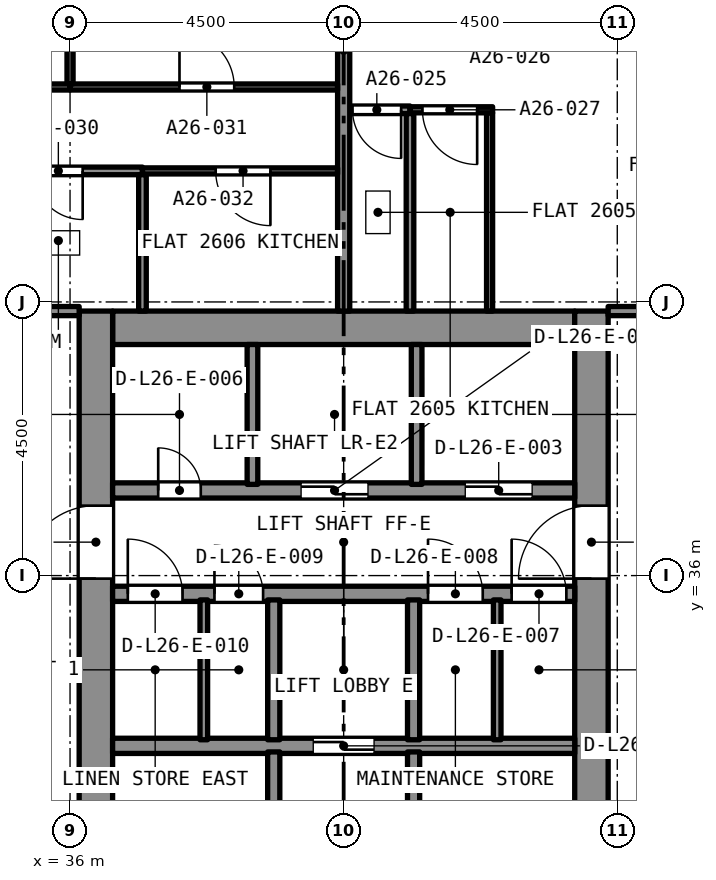
"""IFC4 building model, lengths in metres.
Left out: names, types, materials, properties, quantities, classifications, styles, units other than length and angle.
Written with IfcOpenShell. Run it as: python <this file> out.ifc"""

import sys

from ifc_helpers import new_model, si_unit, direction, frame, frame_2d, origin, place, context, subcontext, project, spatial, rectangle, extrude, element, fill, save


model = new_model("IFC4")
c1 = context("Model", 3, precision=1e-05, world=origin(), true_north=direction((0.0, 1.0)))
c2 = subcontext(c1, "Body", "Model", "MODEL_VIEW")
j1 = project(units=[si_unit("LENGTHUNIT", "METRE"), si_unit("PLANEANGLEUNIT", "RADIAN")], contexts=[c1])
p1 = place(None, origin())
s1 = spatial("IfcSite", under=j1, at=p1, CompositionType="ELEMENT")
p2 = place(p1, origin())
s2 = spatial("IfcBuilding", under=s1, at=p2, CompositionType="ELEMENT")
p3 = place(p2, frame((0.0, 0.0, 96.0)))
s3 = spatial("IfcBuildingStorey", under=s2, at=p3, CompositionType="ELEMENT", Elevation=96.0)
p4 = place(p3, frame((36.7, 40.075, 0.0), z_axis=(0.0, 0.0, 1.0), x_axis=(1.0, 0.0, 0.0)))
e1 = element("IfcWall", 1, at=p4, inside=s3, PredefinedType="SOLIDWALL", context=c2, shape_type="SweptSolid", body=[
    extrude(rectangle(XDim=7.6, YDim=0.55, at=frame_2d((3.8, 0.0))), origin(), (0.0, 0.0, 1.0), 3.2),
])
p5 = place(p3, frame((36.425, 27.15, 0.0), z_axis=(0.0, 0.0, 1.0), x_axis=(0.0, 1.0, 0.0)))
e2 = element("IfcWall", 2, at=p5, inside=s3, PredefinedType="SOLIDWALL", context=c2, shape_type="SweptSolid", body=[
    extrude(rectangle(XDim=13.2, YDim=0.55, at=frame_2d((6.6, 0.0))), origin(), (0.0, 0.0, 1.0), 3.2),
])
p6 = place(p5, frame((8.8, 0.0, 0.0)))
e3 = element("IfcOpeningElement", 3, at=p6, cuts=e2, PredefinedType="OPENING", context=c2, shape_type="SweptSolid", body=[
    extrude(rectangle(XDim=1.2, YDim=2.1, at=frame_2d((0.6, 1.05))), frame((0.0, 0.285, 0.0), z_axis=(0.0, -1.0, 0.0), x_axis=(1.0, 0.0, 0.0)), (0.0, 0.0, 1.0), 0.57),
])
p7 = place(p3, frame((44.575, 27.15, 0.0), z_axis=(0.0, 0.0, 1.0), x_axis=(0.0, 1.0, 0.0)))
e4 = element("IfcWall", 4, at=p7, inside=s3, PredefinedType="SOLIDWALL", context=c2, shape_type="SweptSolid", body=[
    extrude(rectangle(XDim=13.2, YDim=0.55, at=frame_2d((6.6, 0.0))), origin(), (0.0, 0.0, 1.0), 3.2),
])
p8 = place(p7, frame((8.8, 0.0, 0.0)))
e5 = element("IfcOpeningElement", 5, at=p8, cuts=e4, PredefinedType="OPENING", context=c2, shape_type="SweptSolid", body=[
    extrude(rectangle(XDim=1.2, YDim=2.1, at=frame_2d((0.6, 1.05))), frame((0.0, 0.285, 0.0), z_axis=(0.0, -1.0, 0.0), x_axis=(1.0, 0.0, 0.0)), (0.0, 0.0, 1.0), 0.57),
])
p9 = place(p3, frame((41.591, 43.66, 0.0), z_axis=(0.0, 0.0, 1.0), x_axis=(-1.0, 0.0, 0.0)))
e6 = element("IfcWall", 6, at=p9, inside=s3, PredefinedType="PARTITIONING", context=c2, shape_type="SweptSolid", body=[
    extrude(rectangle(XDim=0.991, YDim=0.125, at=frame_2d((0.495, 0.0))), origin(), (0.0, 0.0, 1.0), 2.9),
])
p10 = place(p9, frame((0.146, 0.0, 0.0)))
e7 = element("IfcOpeningElement", 7, at=p10, cuts=e6, PredefinedType="OPENING", context=c2, shape_type="SweptSolid", body=[
    extrude(rectangle(XDim=0.8, YDim=2.1, at=frame_2d((0.4, 1.05))), frame((0.0, 0.073, 0.0), z_axis=(0.0, -1.0, 0.0), x_axis=(1.0, 0.0, 0.0)), (0.0, 0.0, 1.0), 0.145),
])
p11 = place(p3, frame((41.591, 40.35, 0.0), z_axis=(0.0, 0.0, 1.0), x_axis=(0.0, 1.0, 0.0)))
e8 = element("IfcWall", 8, at=p11, inside=s3, PredefinedType="PARTITIONING", context=c2, shape_type="SweptSolid", body=[
    extrude(rectangle(XDim=3.247, YDim=0.125, at=frame_2d((1.624, 0.0))), origin(), (0.0, 0.0, 1.0), 2.9),
])
p12 = place(p3, frame((40.5, 40.35, 0.0), z_axis=(0.0, 0.0, 1.0), x_axis=(0.0, 1.0, 0.0)))
e9 = element("IfcWall", 9, at=p12, inside=s3, PredefinedType="PARTITIONING", context=c2, shape_type="SweptSolid", body=[
    extrude(rectangle(XDim=8.575, YDim=0.2, at=frame_2d((4.288, 0.0))), origin(), (0.0, 0.0, 1.0), 2.9),
])
p13 = place(p3, frame((42.9, 40.35, 0.0), z_axis=(0.0, 0.0, 1.0), x_axis=(0.0, 1.0, 0.0)))
e10 = element("IfcWall", 10, at=p13, inside=s3, PredefinedType="PARTITIONING", context=c2, shape_type="SweptSolid", body=[
    extrude(rectangle(XDim=3.26, YDim=0.1, at=frame_2d((1.63, 0.0))), origin(), (0.0, 0.0, 1.0), 2.9),
])
p14 = place(p3, frame((42.95, 43.66, 0.0), z_axis=(0.0, 0.0, 1.0), x_axis=(-1.0, 0.0, 0.0)))
e11 = element("IfcWall", 11, at=p14, inside=s3, PredefinedType="PARTITIONING", context=c2, shape_type="SweptSolid", body=[
    extrude(rectangle(XDim=1.359, YDim=0.1, at=frame_2d((0.68, 0.0))), origin(), (0.0, 0.0, 1.0), 2.9),
])
p15 = place(p14, frame((0.254, 0.0, 0.0)))
e12 = element("IfcOpeningElement", 12, at=p15, cuts=e11, PredefinedType="OPENING", context=c2, shape_type="SweptSolid", body=[
    extrude(rectangle(XDim=0.9, YDim=2.1, at=frame_2d((0.45, 1.05))), frame((0.0, 0.06, 0.0), z_axis=(0.0, -1.0, 0.0), x_axis=(1.0, 0.0, 0.0)), (0.0, 0.0, 1.0), 0.12),
])
p16 = place(p3, frame((44.85, 40.35, 0.0), z_axis=(0.0, 0.0, 1.0), x_axis=(1.0, 0.0, 0.0)))
e13 = element("IfcWall", 13, at=p16, inside=s3, PredefinedType="PARTITIONING", context=c2, shape_type="SweptSolid", body=[
    extrude(rectangle(XDim=4.075, YDim=0.15, at=frame_2d((2.038, 0.0))), origin(), (0.0, 0.0, 1.0), 2.9),
])
p17 = place(p16, frame((1.9, 0.0, 0.0)))
e14 = element("IfcOpeningElement", 14, at=p17, cuts=e13, PredefinedType="OPENING", context=c2, shape_type="SweptSolid", body=[
    extrude(rectangle(XDim=1.0, YDim=2.1, at=frame_2d((0.5, 1.05))), frame((0.0, 0.085, 0.0), z_axis=(0.0, -1.0, 0.0), x_axis=(1.0, 0.0, 0.0)), (0.0, 0.0, 1.0), 0.17),
])
p18 = place(p3, frame((37.19, 42.655, 0.0), z_axis=(0.0, 0.0, 1.0), x_axis=(-1.0, 0.0, 0.0)))
e15 = element("IfcWall", 15, at=p18, inside=s3, PredefinedType="PARTITIONING", context=c2, shape_type="SweptSolid", body=[
    extrude(rectangle(XDim=2.828, YDim=0.125, at=frame_2d((1.414, 0.0))), origin(), (0.0, 0.0, 1.0), 2.9),
])
p19 = place(p18, frame((0.983, 0.0, 0.0)))
e16 = element("IfcOpeningElement", 16, at=p19, cuts=e15, PredefinedType="OPENING", context=c2, shape_type="SweptSolid", body=[
    extrude(rectangle(XDim=0.8, YDim=2.1, at=frame_2d((0.4, 1.05))), frame((0.0, 0.073, 0.0), z_axis=(0.0, -1.0, 0.0), x_axis=(1.0, 0.0, 0.0)), (0.0, 0.0, 1.0), 0.145),
])
p20 = place(p3, frame((37.191, 40.35, 0.0), z_axis=(0.0, 0.0, 1.0), x_axis=(0.0, 1.0, 0.0)))
e17 = element("IfcWall", 17, at=p20, inside=s3, PredefinedType="PARTITIONING", context=c2, shape_type="SweptSolid", body=[
    extrude(rectangle(XDim=2.242, YDim=0.125, at=frame_2d((1.121, 0.0))), origin(), (0.0, 0.0, 1.0), 2.9),
])
p21 = place(p3, frame((34.425, 40.35, 0.0), z_axis=(0.0, 0.0, 1.0), x_axis=(1.0, 0.0, 0.0)))
e18 = element("IfcWall", 18, at=p21, inside=s3, PredefinedType="PARTITIONING", context=c2, shape_type="SweptSolid", body=[
    extrude(rectangle(XDim=1.725, YDim=0.15, at=frame_2d((0.862, 0.0))), origin(), (0.0, 0.0, 1.0), 2.9),
])
p22 = place(p3, frame((36.0, 44.035, 0.0), z_axis=(0.0, 0.0, 1.0), x_axis=(1.0, 0.0, 0.0)))
e19 = element("IfcWall", 19, at=p22, inside=s3, PredefinedType="PARTITIONING", context=c2, shape_type="SweptSolid", body=[
    extrude(rectangle(XDim=4.4, YDim=0.1, at=frame_2d((2.2, 0.0))), origin(), (0.0, 0.0, 1.0), 2.9),
])
p23 = place(p22, frame((1.8, 0.0, 0.0)))
e20 = element("IfcOpeningElement", 20, at=p23, cuts=e19, PredefinedType="OPENING", context=c2, shape_type="SweptSolid", body=[
    extrude(rectangle(XDim=0.9, YDim=2.1, at=frame_2d((0.45, 1.05))), frame((0.0, 0.06, 0.0), z_axis=(0.0, -1.0, 0.0), x_axis=(1.0, 0.0, 0.0)), (0.0, 0.0, 1.0), 0.12),
])
p24 = place(p3, frame((36.0, 44.085, 0.0), z_axis=(0.0, 0.0, 1.0), x_axis=(0.0, 1.0, 0.0)))
e21 = element("IfcWall", 21, at=p24, inside=s3, PredefinedType="PARTITIONING", context=c2, shape_type="SweptSolid", body=[
    extrude(rectangle(XDim=4.84, YDim=0.1, at=frame_2d((2.42, 0.0))), origin(), (0.0, 0.0, 1.0), 2.9),
])
p25 = place(p3, frame((40.4, 42.655, 0.0), z_axis=(0.0, 0.0, 1.0), x_axis=(-1.0, 0.0, 0.0)))
e22 = element("IfcWall", 22, at=p25, inside=s3, PredefinedType="PARTITIONING", context=c2, shape_type="SweptSolid", body=[
    extrude(rectangle(XDim=3.209, YDim=0.1, at=frame_2d((1.605, 0.0))), origin(), (0.0, 0.0, 1.0), 2.9),
])
p26 = place(p25, frame((1.105, 0.0, 0.0)))
e23 = element("IfcOpeningElement", 23, at=p26, cuts=e22, PredefinedType="OPENING", context=c2, shape_type="SweptSolid", body=[
    extrude(rectangle(XDim=0.9, YDim=2.1, at=frame_2d((0.45, 1.05))), frame((0.0, 0.06, 0.0), z_axis=(0.0, -1.0, 0.0), x_axis=(1.0, 0.0, 0.0)), (0.0, 0.0, 1.0), 0.12),
])
p27 = place(p3, frame((31.6, 44.035, 0.0), z_axis=(0.0, 0.0, 1.0), x_axis=(1.0, 0.0, 0.0)))
e24 = element("IfcWall", 24, at=p27, inside=s3, PredefinedType="PARTITIONING", context=c2, shape_type="SweptSolid", body=[
    extrude(rectangle(XDim=4.4, YDim=0.1, at=frame_2d((2.2, 0.0))), origin(), (0.0, 0.0, 1.0), 2.9),
])
p28 = place(p27, frame((1.65, 0.0, 0.0)))
e25 = element("IfcOpeningElement", 25, at=p28, cuts=e24, PredefinedType="OPENING", context=c2, shape_type="SweptSolid", body=[
    extrude(rectangle(XDim=1.0, YDim=2.1, at=frame_2d((0.5, 1.05))), frame((0.0, 0.06, 0.0), z_axis=(0.0, -1.0, 0.0), x_axis=(1.0, 0.0, 0.0)), (0.0, 0.0, 1.0), 0.12),
])
p29 = place(p3, frame((36.7, 33.2, 0.0), z_axis=(0.0, 0.0, 1.0), x_axis=(1.0, 0.0, 0.0)))
e26 = element("IfcWall", 26, at=p29, inside=s3, PredefinedType="SOLIDWALL", context=c2, shape_type="SweptSolid", body=[
    extrude(rectangle(XDim=7.6, YDim=0.25, at=frame_2d((3.8, 0.0))), origin(), (0.0, 0.0, 1.0), 2.9),
])
p30 = place(p29, frame((3.3, 0.0, 0.0)))
e27 = element("IfcOpeningElement", 27, at=p30, cuts=e26, PredefinedType="OPENING", context=c2, shape_type="SweptSolid", body=[
    extrude(rectangle(XDim=1.0, YDim=2.1, at=frame_2d((0.5, 1.05))), frame((0.0, 0.135, 0.0), z_axis=(0.0, -1.0, 0.0), x_axis=(1.0, 0.0, 0.0)), (0.0, 0.0, 1.0), 0.27),
])
p31 = place(p3, frame((36.7, 35.7, 0.0), z_axis=(0.0, 0.0, 1.0), x_axis=(1.0, 0.0, 0.0)))
e28 = element("IfcWall", 28, at=p31, inside=s3, PredefinedType="SOLIDWALL", context=c2, shape_type="SweptSolid", body=[
    extrude(rectangle(XDim=7.6, YDim=0.25, at=frame_2d((3.8, 0.0))), origin(), (0.0, 0.0, 1.0), 2.9),
])
p32 = place(p31, frame((6.562, 0.0, 0.0)))
e29 = element("IfcOpeningElement", 29, at=p32, cuts=e28, PredefinedType="OPENING", context=c2, shape_type="SweptSolid", body=[
    extrude(rectangle(XDim=0.9, YDim=2.1, at=frame_2d((0.45, 1.05))), frame((0.0, 0.135, 0.0), z_axis=(0.0, -1.0, 0.0), x_axis=(1.0, 0.0, 0.0)), (0.0, 0.0, 1.0), 0.27),
])
p33 = place(p31, frame((5.188, 0.0, 0.0)))
e30 = element("IfcOpeningElement", 30, at=p33, cuts=e28, PredefinedType="OPENING", context=c2, shape_type="SweptSolid", body=[
    extrude(rectangle(XDim=0.9, YDim=2.1, at=frame_2d((0.45, 1.05))), frame((0.0, 0.135, 0.0), z_axis=(0.0, -1.0, 0.0), x_axis=(1.0, 0.0, 0.0)), (0.0, 0.0, 1.0), 0.27),
])
p34 = place(p31, frame((1.675, 0.0, 0.0)))
e31 = element("IfcOpeningElement", 31, at=p34, cuts=e28, PredefinedType="OPENING", context=c2, shape_type="SweptSolid", body=[
    extrude(rectangle(XDim=0.8, YDim=2.1, at=frame_2d((0.4, 1.05))), frame((0.0, 0.135, 0.0), z_axis=(0.0, -1.0, 0.0), x_axis=(1.0, 0.0, 0.0)), (0.0, 0.0, 1.0), 0.27),
])
p35 = place(p31, frame((0.25, 0.0, 0.0)))
e32 = element("IfcOpeningElement", 32, at=p35, cuts=e28, PredefinedType="OPENING", context=c2, shape_type="SweptSolid", body=[
    extrude(rectangle(XDim=0.9, YDim=2.1, at=frame_2d((0.45, 1.05))), frame((0.0, 0.135, 0.0), z_axis=(0.0, -1.0, 0.0), x_axis=(1.0, 0.0, 0.0)), (0.0, 0.0, 1.0), 0.27),
])
p36 = place(p3, frame((36.7, 37.4, 0.0), z_axis=(0.0, 0.0, 1.0), x_axis=(1.0, 0.0, 0.0)))
e33 = element("IfcWall", 33, at=p36, inside=s3, PredefinedType="SOLIDWALL", context=c2, shape_type="SweptSolid", body=[
    extrude(rectangle(XDim=7.6, YDim=0.25, at=frame_2d((3.8, 0.0))), origin(), (0.0, 0.0, 1.0), 2.9),
])
p37 = place(p36, frame((5.8, 0.0, 0.0)))
e34 = element("IfcOpeningElement", 34, at=p37, cuts=e33, PredefinedType="OPENING", context=c2, shape_type="SweptSolid", body=[
    extrude(rectangle(XDim=1.1, YDim=2.4, at=frame_2d((0.55, 1.2))), frame((0.0, 0.135, 0.0), z_axis=(0.0, -1.0, 0.0), x_axis=(1.0, 0.0, 0.0)), (0.0, 0.0, 1.0), 0.27),
])
p38 = place(p36, frame((3.1, 0.0, 0.0)))
e35 = element("IfcOpeningElement", 35, at=p38, cuts=e33, PredefinedType="OPENING", context=c2, shape_type="SweptSolid", body=[
    extrude(rectangle(XDim=1.1, YDim=2.4, at=frame_2d((0.55, 1.2))), frame((0.0, 0.135, 0.0), z_axis=(0.0, -1.0, 0.0), x_axis=(1.0, 0.0, 0.0)), (0.0, 0.0, 1.0), 0.27),
])
p39 = place(p36, frame((0.75, 0.0, 0.0)))
e36 = element("IfcOpeningElement", 36, at=p39, cuts=e33, PredefinedType="OPENING", context=c2, shape_type="SweptSolid", body=[
    extrude(rectangle(XDim=0.7, YDim=2.1, at=frame_2d((0.35, 1.05))), frame((0.0, 0.135, 0.0), z_axis=(0.0, -1.0, 0.0), x_axis=(1.0, 0.0, 0.0)), (0.0, 0.0, 1.0), 0.27),
])
p40 = place(p3, frame((41.65, 27.7, 0.0), z_axis=(0.0, 0.0, 1.0), x_axis=(0.0, 1.0, 0.0)))
e37 = element("IfcWall", 37, at=p40, inside=s3, PredefinedType="SOLIDWALL", context=c2, shape_type="SweptSolid", body=[
    extrude(rectangle(XDim=5.4, YDim=0.2, at=frame_2d((2.7, 0.0))), origin(), (0.0, 0.0, 1.0), 2.9),
])
p41 = place(p40, frame((0.2, 0.0, 0.0)))
e38 = element("IfcOpeningElement", 38, at=p41, cuts=e37, PredefinedType="OPENING", context=c2, shape_type="SweptSolid", body=[
    extrude(rectangle(XDim=0.9, YDim=2.1, at=frame_2d((0.45, 1.05))), frame((0.0, 0.11, 0.0), z_axis=(0.0, -1.0, 0.0), x_axis=(1.0, 0.0, 0.0)), (0.0, 0.0, 1.0), 0.22),
])
p42 = place(p3, frame((39.35, 27.7, 0.0), z_axis=(0.0, 0.0, 1.0), x_axis=(0.0, 1.0, 0.0)))
e39 = element("IfcWall", 39, at=p42, inside=s3, PredefinedType="SOLIDWALL", context=c2, shape_type="SweptSolid", body=[
    extrude(rectangle(XDim=5.4, YDim=0.2, at=frame_2d((2.7, 0.0))), origin(), (0.0, 0.0, 1.0), 2.9),
])
p43 = place(p42, frame((0.2, 0.0, 0.0)))
e40 = element("IfcOpeningElement", 40, at=p43, cuts=e39, PredefinedType="OPENING", context=c2, shape_type="SweptSolid", body=[
    extrude(rectangle(XDim=0.9, YDim=2.1, at=frame_2d((0.45, 1.05))), frame((0.0, 0.11, 0.0), z_axis=(0.0, -1.0, 0.0), x_axis=(1.0, 0.0, 0.0)), (0.0, 0.0, 1.0), 0.22),
])
for number, where, z_axis, x_axis in (
    (41, (41.65, 33.3, 0.0), (0.0, 0.0, 1.0), (0.0, 1.0, 0.0)),
    (42, (39.35, 33.3, 0.0), (0.0, 0.0, 1.0), (0.0, 1.0, 0.0)),
):
    element("IfcWall", number, at=place(p3, frame(where, z_axis=z_axis, x_axis=x_axis)), inside=s3, PredefinedType="SOLIDWALL", context=c2, shape_type="SweptSolid", body=[
        extrude(rectangle(XDim=2.3, YDim=0.2, at=frame_2d((1.15, 0.0))), origin(), (0.0, 0.0, 1.0), 2.9),
    ])
for number, where, z_axis, x_axis in (
    (43, (41.7, 37.5, 0.0), (0.0, 0.0, 1.0), (0.0, 1.0, 0.0)),
    (44, (39.0, 37.5, 0.0), (0.0, 0.0, 1.0), (0.0, 1.0, 0.0)),
):
    element("IfcWall", number, at=place(p3, frame(where, z_axis=z_axis, x_axis=x_axis)), inside=s3, PredefinedType="SOLIDWALL", context=c2, shape_type="SweptSolid", body=[
        extrude(rectangle(XDim=2.3, YDim=0.175, at=frame_2d((1.15, 0.0))), origin(), (0.0, 0.0, 1.0), 2.9),
    ])
for number, where, z_axis, x_axis in (
    (45, (43.025, 33.3, 0.0), (0.0, 0.0, 1.0), (0.0, 1.0, 0.0)),
    (46, (38.2, 33.3, 0.0), (0.0, 0.0, 1.0), (0.0, 1.0, 0.0)),
):
    element("IfcWall", number, at=place(p3, frame(where, z_axis=z_axis, x_axis=x_axis)), inside=s3, PredefinedType="PARTITIONING", context=c2, shape_type="SweptSolid", body=[
        extrude(rectangle(XDim=2.3, YDim=0.125, at=frame_2d((1.15, 0.0))), origin(), (0.0, 0.0, 1.0), 2.9),
    ])
p44 = place(p10, origin())
e47 = element("IfcDoor", 47, at=p44, inside=s3, OperationType="SINGLE_SWING_RIGHT", PredefinedType="DOOR", context=c2, shape_type="SweptSolid", body=[
    extrude(rectangle(XDim=0.8, YDim=2.1, at=frame_2d((0.4, 1.05))), frame((0.0, 0.025, 0.0), z_axis=(0.0, -1.0, 0.0), x_axis=(1.0, 0.0, 0.0)), (0.0, 0.0, 1.0), 0.05),
])
fill(e7, e47)
p45 = place(p15, origin())
e48 = element("IfcDoor", 48, at=p45, inside=s3, OperationType="SINGLE_SWING_RIGHT", PredefinedType="DOOR", context=c2, shape_type="SweptSolid", body=[
    extrude(rectangle(XDim=0.9, YDim=2.1, at=frame_2d((0.45, 1.05))), frame((0.0, 0.025, 0.0), z_axis=(0.0, -1.0, 0.0), x_axis=(1.0, 0.0, 0.0)), (0.0, 0.0, 1.0), 0.05),
])
fill(e12, e48)
p46 = place(p19, origin())
e49 = element("IfcDoor", 49, at=p46, inside=s3, OperationType="SINGLE_SWING_LEFT", PredefinedType="DOOR", context=c2, shape_type="SweptSolid", body=[
    extrude(rectangle(XDim=0.8, YDim=2.1, at=frame_2d((0.4, 1.05))), frame((0.0, 0.025, 0.0), z_axis=(0.0, -1.0, 0.0), x_axis=(1.0, 0.0, 0.0)), (0.0, 0.0, 1.0), 0.05),
])
fill(e16, e49)
p47 = place(p23, origin())
e50 = element("IfcDoor", 50, at=p47, inside=s3, OperationType="SINGLE_SWING_RIGHT", PredefinedType="DOOR", context=c2, shape_type="SweptSolid", body=[
    extrude(rectangle(XDim=0.9, YDim=2.1, at=frame_2d((0.45, 1.05))), frame((0.0, 0.025, 0.0), z_axis=(0.0, -1.0, 0.0), x_axis=(1.0, 0.0, 0.0)), (0.0, 0.0, 1.0), 0.05),
])
fill(e20, e50)
p48 = place(p26, origin())
e51 = element("IfcDoor", 51, at=p48, inside=s3, OperationType="SINGLE_SWING_LEFT", PredefinedType="DOOR", context=c2, shape_type="SweptSolid", body=[
    extrude(rectangle(XDim=0.9, YDim=2.1, at=frame_2d((0.45, 1.05))), frame((0.0, 0.025, 0.0), z_axis=(0.0, -1.0, 0.0), x_axis=(1.0, 0.0, 0.0)), (0.0, 0.0, 1.0), 0.05),
])
fill(e23, e51)
p49 = place(p37, origin())
e52 = element("IfcDoor", 52, at=p49, inside=s3, OperationType="SLIDING_TO_LEFT", PredefinedType="DOOR", context=c2, shape_type="SweptSolid", body=[
    extrude(rectangle(XDim=1.1, YDim=2.4, at=frame_2d((0.55, 1.2))), frame((0.0, 0.025, 0.0), z_axis=(0.0, -1.0, 0.0), x_axis=(1.0, 0.0, 0.0)), (0.0, 0.0, 1.0), 0.05),
])
fill(e34, e52)
p50 = place(p38, origin())
e53 = element("IfcDoor", 53, at=p50, inside=s3, OperationType="SLIDING_TO_LEFT", PredefinedType="DOOR", context=c2, shape_type="SweptSolid", body=[
    extrude(rectangle(XDim=1.1, YDim=2.4, at=frame_2d((0.55, 1.2))), frame((0.0, 0.025, 0.0), z_axis=(0.0, -1.0, 0.0), x_axis=(1.0, 0.0, 0.0)), (0.0, 0.0, 1.0), 0.05),
])
fill(e35, e53)
p51 = place(p30, origin())
e54 = element("IfcDoor", 54, at=p51, inside=s3, OperationType="SLIDING_TO_LEFT", PredefinedType="DOOR", context=c2, shape_type="SweptSolid", body=[
    extrude(rectangle(XDim=1.0, YDim=2.1, at=frame_2d((0.5, 1.05))), frame((0.0, 0.025, 0.0), z_axis=(0.0, -1.0, 0.0), x_axis=(1.0, 0.0, 0.0)), (0.0, 0.0, 1.0), 0.05),
])
fill(e27, e54)
p52 = place(p39, origin())
e55 = element("IfcDoor", 55, at=p52, inside=s3, OperationType="SINGLE_SWING_LEFT", PredefinedType="DOOR", context=c2, shape_type="SweptSolid", body=[
    extrude(rectangle(XDim=0.7, YDim=2.1, at=frame_2d((0.35, 1.05))), frame((0.0, 0.025, 0.0), z_axis=(0.0, -1.0, 0.0), x_axis=(1.0, 0.0, 0.0)), (0.0, 0.0, 1.0), 0.05),
])
fill(e36, e55)
p53 = place(p32, origin())
e56 = element("IfcDoor", 56, at=p53, inside=s3, OperationType="SINGLE_SWING_LEFT", PredefinedType="DOOR", context=c2, shape_type="SweptSolid", body=[
    extrude(rectangle(XDim=0.9, YDim=2.1, at=frame_2d((0.45, 1.05))), frame((0.0, 0.025, 0.0), z_axis=(0.0, -1.0, 0.0), x_axis=(1.0, 0.0, 0.0)), (0.0, 0.0, 1.0), 0.05),
])
fill(e29, e56)
p54 = place(p33, origin())
e57 = element("IfcDoor", 57, at=p54, inside=s3, OperationType="SINGLE_SWING_LEFT", PredefinedType="DOOR", context=c2, shape_type="SweptSolid", body=[
    extrude(rectangle(XDim=0.9, YDim=2.1, at=frame_2d((0.45, 1.05))), frame((0.0, 0.025, 0.0), z_axis=(0.0, -1.0, 0.0), x_axis=(1.0, 0.0, 0.0)), (0.0, 0.0, 1.0), 0.05),
])
fill(e30, e57)
p55 = place(p34, origin())
e58 = element("IfcDoor", 58, at=p55, inside=s3, OperationType="SINGLE_SWING_LEFT", PredefinedType="DOOR", context=c2, shape_type="SweptSolid", body=[
    extrude(rectangle(XDim=0.8, YDim=2.1, at=frame_2d((0.4, 1.05))), frame((0.0, 0.025, 0.0), z_axis=(0.0, -1.0, 0.0), x_axis=(1.0, 0.0, 0.0)), (0.0, 0.0, 1.0), 0.05),
])
fill(e31, e58)
p56 = place(p35, origin())
e59 = element("IfcDoor", 59, at=p56, inside=s3, OperationType="SINGLE_SWING_LEFT", PredefinedType="DOOR", context=c2, shape_type="SweptSolid", body=[
    extrude(rectangle(XDim=0.9, YDim=2.1, at=frame_2d((0.45, 1.05))), frame((0.0, 0.025, 0.0), z_axis=(0.0, -1.0, 0.0), x_axis=(1.0, 0.0, 0.0)), (0.0, 0.0, 1.0), 0.05),
])
fill(e32, e59)
p57 = place(p6, origin())
e60 = element("IfcDoor", 60, at=p57, inside=s3, OperationType="SINGLE_SWING_LEFT", PredefinedType="DOOR", context=c2, shape_type="SweptSolid", body=[
    extrude(rectangle(XDim=1.2, YDim=2.1, at=frame_2d((0.6, 1.05))), frame((0.0, 0.025, 0.0), z_axis=(0.0, -1.0, 0.0), x_axis=(1.0, 0.0, 0.0)), (0.0, 0.0, 1.0), 0.05),
])
fill(e3, e60)
p58 = place(p8, origin())
e61 = element("IfcDoor", 61, at=p58, inside=s3, OperationType="SINGLE_SWING_LEFT", PredefinedType="DOOR", context=c2, shape_type="SweptSolid", body=[
    extrude(rectangle(XDim=1.2, YDim=2.1, at=frame_2d((0.6, 1.05))), frame((0.0, 0.025, 0.0), z_axis=(0.0, -1.0, 0.0), x_axis=(1.0, 0.0, 0.0)), (0.0, 0.0, 1.0), 0.05),
])
fill(e5, e61)
save(model, sys.argv[1])
